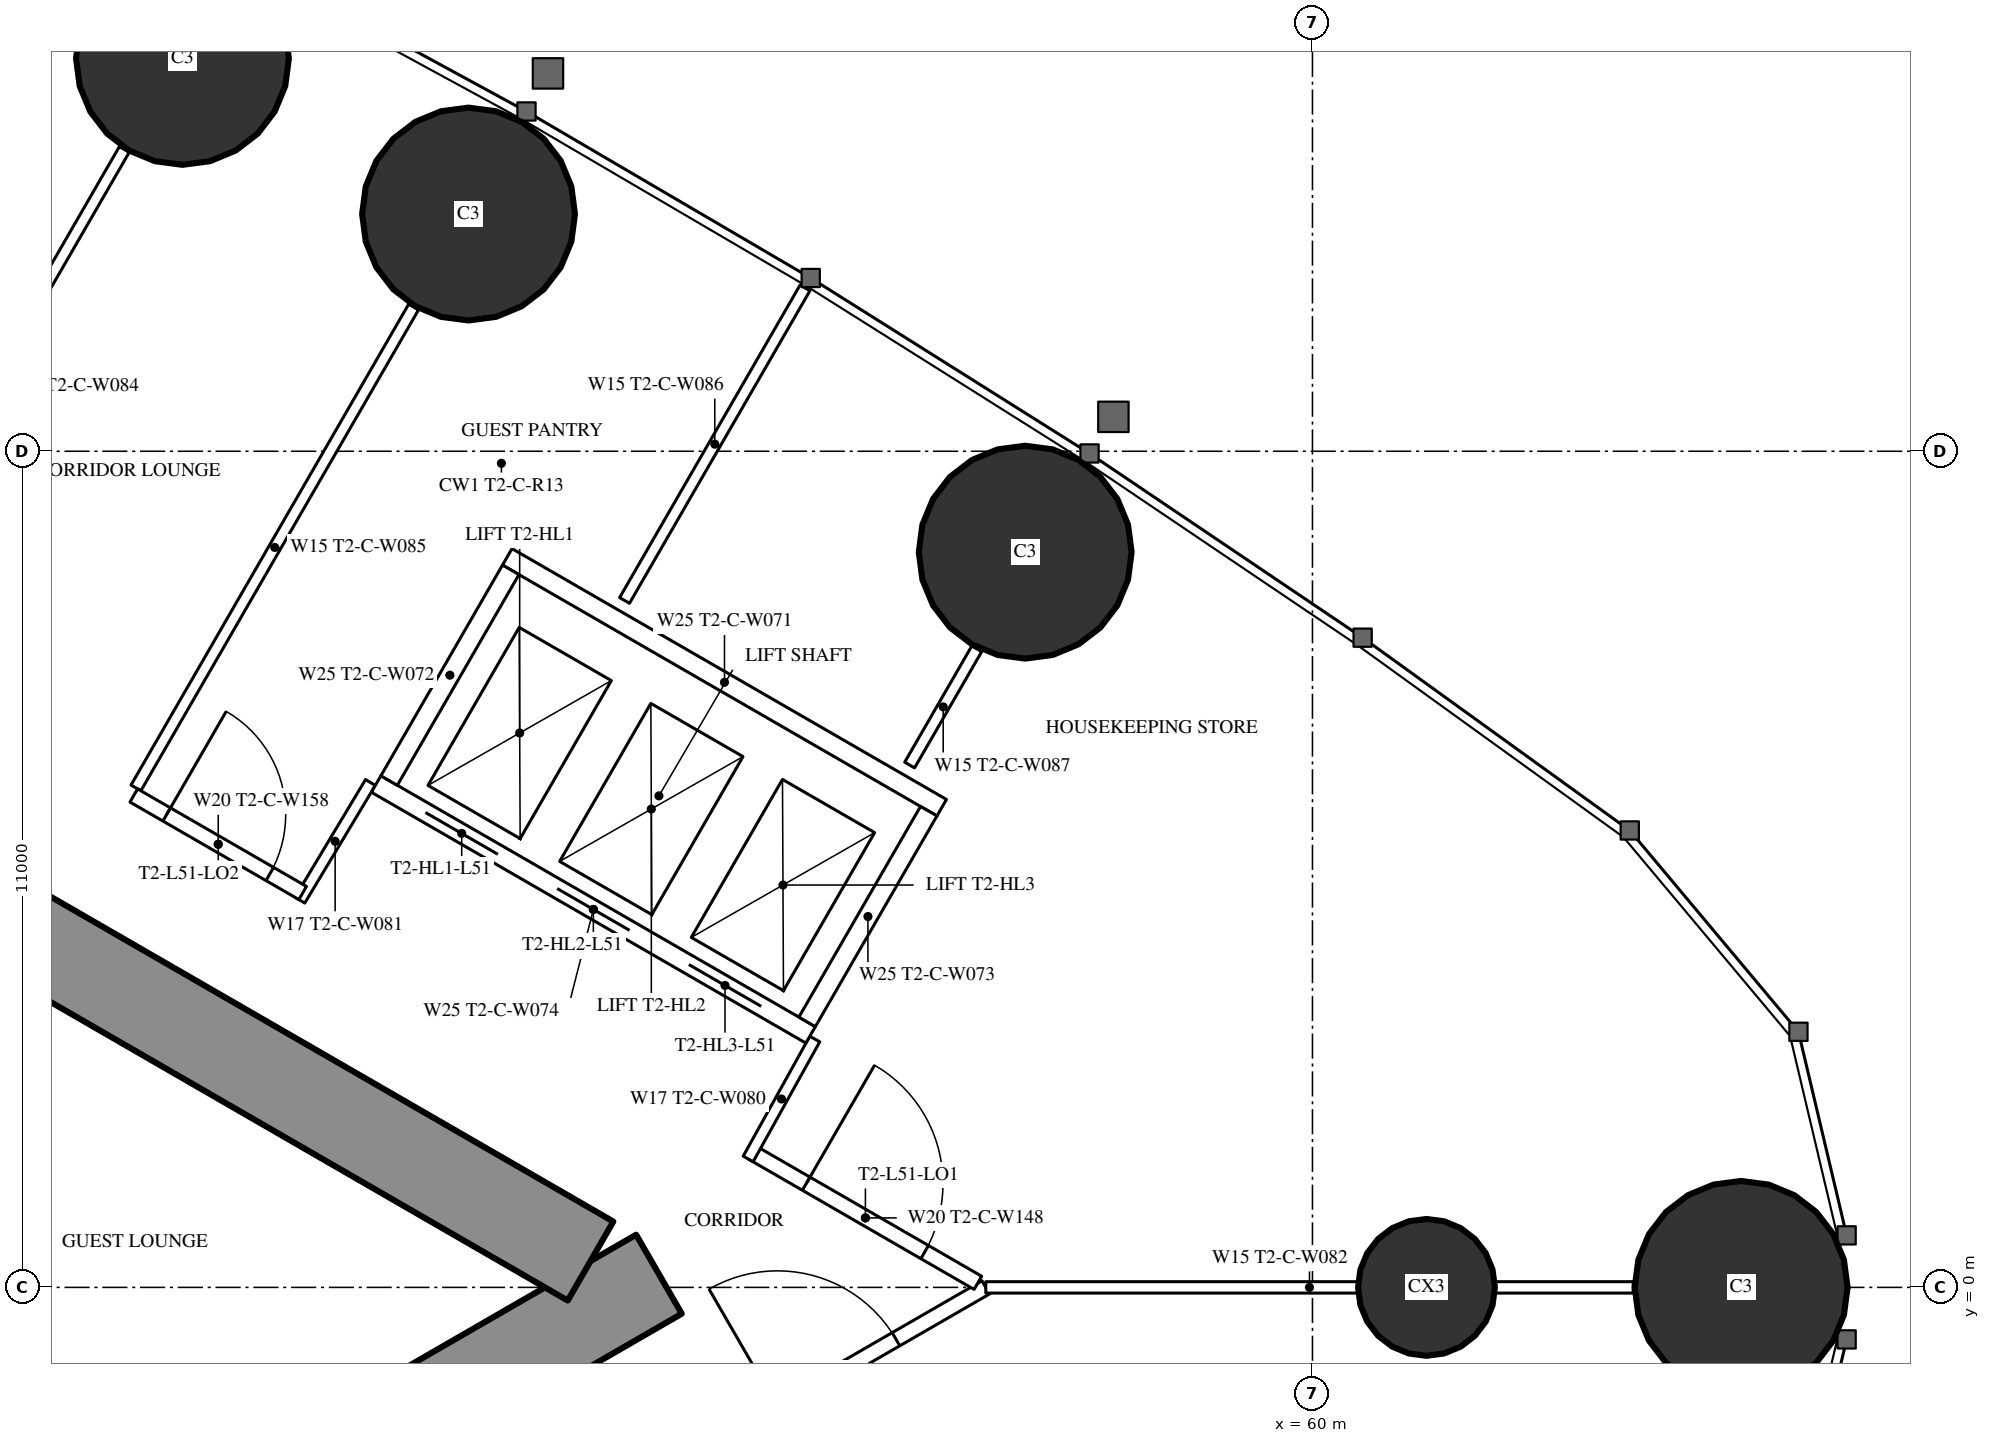
"""IFC4 building model, lengths in metres.
Left out: names, types, materials, properties, quantities, classifications, styles, units other than length and angle.
Written with IfcOpenShell. Run it as: python <this file> out.ifc"""

import sys

from ifc_helpers import new_model, si_unit, direction, frame, frame_2d, origin, origin_2d, place, context, subcontext, project, spatial, rectangle, circle, extrude, element, fill, save


model = new_model("IFC4")
c1 = context("Model", 3, precision=1e-05, world=origin(), true_north=direction((0.0, 1.0)))
c2 = subcontext(c1, "Body", "Model", "MODEL_VIEW")
j1 = project(units=[si_unit("LENGTHUNIT", "METRE"), si_unit("PLANEANGLEUNIT", "RADIAN")], contexts=[c1])
p1 = place(None, origin())
s1 = spatial("IfcSite", under=j1, at=p1, CompositionType="ELEMENT")
p2 = place(p1, origin())
s2 = spatial("IfcBuilding", under=s1, at=p2, CompositionType="ELEMENT")
p3 = place(p2, frame((0.0, 0.0, 191.3)))
s3 = spatial("IfcBuildingStorey", under=s2, at=p3, CompositionType="ELEMENT", Elevation=191.3)
for number, where, z_axis, x_axis in (
    (1, (65.64, 0.0, 0.0), (0.0, 0.0, 1.0), (1.0, 0.0, 0.0)),
    (2, (56.221, 9.672, 0.0), (0.0, 0.0, 1.0), (1.0, 0.0, 0.0)),
    (3, (48.897, 14.121, 0.0), (0.0, 0.0, 1.0), (1.0, 0.0, 0.0)),
    (4, (45.134, 16.168, 0.0), (0.0, 0.0, 1.0), (1.0, 0.0, 0.0)),
):
    element("IfcColumn", number, at=place(p3, frame(where, z_axis=z_axis, x_axis=x_axis)), inside=s3, PredefinedType="COLUMN", context=c2, shape_type="SweptSolid", body=[
        extrude(circle(Radius=1.4, at=origin_2d()), origin(), (0.0, 0.0, 1.0), 3.5),
    ])
p4 = place(p3, frame((61.5, 0.0, 0.0), z_axis=(0.0, 0.0, 1.0), x_axis=(1.0, 0.0, 0.0)))
e5 = element("IfcColumn", 5, at=p4, inside=s3, PredefinedType="COLUMN", context=c2, shape_type="SweptSolid", body=[
    extrude(circle(Radius=0.9, at=origin_2d()), origin(), (0.0, 0.0, 1.0), 3.5),
])
p5 = place(p3, frame((27.2, -13.8, 0.0), z_axis=(0.0, 0.0, 1.0), x_axis=(0.866027159892, 0.499996958321, 0.0)))
e6 = element("IfcWall", 6, at=p5, inside=s3, PredefinedType="SHEAR", context=c2, shape_type="SweptSolid", body=[
    extrude(rectangle(XDim=27.947, YDim=1.2, at=frame_2d((13.973, 0.0))), origin(), (0.0, 0.0, 1.0), 3.5),
])
p6 = place(p5, frame((4.6, 0.0, 0.0)))
e7 = element("IfcOpeningElement", 7, at=p6, cuts=e6, PredefinedType="OPENING", context=c2, shape_type="SweptSolid", body=[
    extrude(rectangle(XDim=1.0, YDim=2.2, at=frame_2d((0.5, 1.1))), frame((0.0, 0.61, 0.0), z_axis=(0.0, -1.0, 0.0), x_axis=(1.0, 0.0, 0.0)), (0.0, 0.0, 1.0), 1.22),
])
p7 = place(p5, frame((13.395, 0.0, 0.0)))
e8 = element("IfcOpeningElement", 8, at=p7, cuts=e6, PredefinedType="OPENING", context=c2, shape_type="SweptSolid", body=[
    extrude(rectangle(XDim=1.8, YDim=2.2, at=frame_2d((0.9, 1.1))), frame((0.0, 0.61, 0.0), z_axis=(0.0, -1.0, 0.0), x_axis=(1.0, 0.0, 0.0)), (0.0, 0.0, 1.0), 1.22),
])
p8 = place(p3, frame((27.2, 13.8, 0.0), z_axis=(0.0, 0.0, 1.0), x_axis=(0.866024515034, -0.500001539357, 0.0)))
e9 = element("IfcWall", 9, at=p8, inside=s3, PredefinedType="SHEAR", context=c2, shape_type="SweptSolid", body=[
    extrude(rectangle(XDim=26.907, YDim=1.2, at=frame_2d((13.454, 0.0))), origin(), (0.0, 0.0, 1.0), 3.5),
])
p9 = place(p8, frame((4.6, 0.0, 0.0)))
e10 = element("IfcOpeningElement", 10, at=p9, cuts=e9, PredefinedType="OPENING", context=c2, shape_type="SweptSolid", body=[
    extrude(rectangle(XDim=1.0, YDim=2.2, at=frame_2d((0.5, 1.1))), frame((0.0, 0.61, 0.0), z_axis=(0.0, -1.0, 0.0), x_axis=(1.0, 0.0, 0.0)), (0.0, 0.0, 1.0), 1.22),
])
p10 = place(p8, frame((13.395, 0.0, 0.0)))
e11 = element("IfcOpeningElement", 11, at=p10, cuts=e9, PredefinedType="OPENING", context=c2, shape_type="SweptSolid", body=[
    extrude(rectangle(XDim=1.8, YDim=2.2, at=frame_2d((0.9, 1.1))), frame((0.0, 0.61, 0.0), z_axis=(0.0, -1.0, 0.0), x_axis=(1.0, 0.0, 0.0)), (0.0, 0.0, 1.0), 1.22),
])
p11 = place(p3, frame((27.959, -16.017, 0.0), z_axis=(0.0, 0.0, 1.0), x_axis=(0.866024151371, 0.500002169237, 0.0)))
e12 = element("IfcWall", 12, at=p11, inside=s3, PredefinedType="PARTITIONING", context=c2, shape_type="SweptSolid", body=[
    extrude(rectangle(XDim=32.034, YDim=0.2, at=frame_2d((16.017, 0.0))), origin(), (0.0, 0.0, 1.0), 3.25),
])
p12 = place(p11, frame((0.6, 0.0, 0.0)))
e13 = element("IfcOpeningElement", 13, at=p12, cuts=e12, PredefinedType="OPENING", context=c2, shape_type="SweptSolid", body=[
    extrude(rectangle(XDim=0.95, YDim=2.2, at=frame_2d((0.475, 1.1))), frame((0.0, 0.11, 0.0), z_axis=(0.0, -1.0, 0.0), x_axis=(1.0, 0.0, 0.0)), (0.0, 0.0, 1.0), 0.22),
])
p13 = place(p11, frame((13.132, 0.0, 0.0)))
e14 = element("IfcOpeningElement", 14, at=p13, cuts=e12, PredefinedType="OPENING", context=c2, shape_type="SweptSolid", body=[
    extrude(rectangle(XDim=0.95, YDim=2.2, at=frame_2d((0.475, 1.1))), frame((0.0, 0.11, 0.0), z_axis=(0.0, -1.0, 0.0), x_axis=(1.0, 0.0, 0.0)), (0.0, 0.0, 1.0), 0.22),
])
p14 = place(p11, frame((15.391, 0.0, 0.0)))
e15 = element("IfcOpeningElement", 15, at=p14, cuts=e12, PredefinedType="OPENING", context=c2, shape_type="SweptSolid", body=[
    extrude(rectangle(XDim=0.95, YDim=2.2, at=frame_2d((0.475, 1.1))), frame((0.0, 0.11, 0.0), z_axis=(0.0, -1.0, 0.0), x_axis=(1.0, 0.0, 0.0)), (0.0, 0.0, 1.0), 0.22),
])
p15 = place(p11, frame((19.441, 0.0, 0.0)))
e16 = element("IfcOpeningElement", 16, at=p15, cuts=e12, PredefinedType="OPENING", context=c2, shape_type="SweptSolid", body=[
    extrude(rectangle(XDim=0.95, YDim=2.2, at=frame_2d((0.475, 1.1))), frame((0.0, 0.11, 0.0), z_axis=(0.0, -1.0, 0.0), x_axis=(1.0, 0.0, 0.0)), (0.0, 0.0, 1.0), 0.22),
])
p16 = place(p11, frame((26.406, 0.0, 0.0)))
e17 = element("IfcOpeningElement", 17, at=p16, cuts=e12, PredefinedType="OPENING", context=c2, shape_type="SweptSolid", body=[
    extrude(rectangle(XDim=0.95, YDim=2.2, at=frame_2d((0.475, 1.1))), frame((0.0, 0.11, 0.0), z_axis=(0.0, -1.0, 0.0), x_axis=(1.0, 0.0, 0.0)), (0.0, 0.0, 1.0), 0.22),
])
p17 = place(p11, frame((28.87, 0.0, 0.0)))
e18 = element("IfcOpeningElement", 18, at=p17, cuts=e12, PredefinedType="OPENING", context=c2, shape_type="SweptSolid", body=[
    extrude(rectangle(XDim=1.8, YDim=2.2, at=frame_2d((0.9, 1.1))), frame((0.0, 0.11, 0.0), z_axis=(0.0, -1.0, 0.0), x_axis=(1.0, 0.0, 0.0)), (0.0, 0.0, 1.0), 0.22),
])
p18 = place(p3, frame((40.769, 8.737, 0.0), z_axis=(0.0, 0.0, 1.0), x_axis=(0.500013115284, 0.866017831539, 0.0)))
e19 = element("IfcWall", 19, at=p18, inside=s3, PredefinedType="PARTITIONING", context=c2, shape_type="SweptSolid", body=[
    extrude(rectangle(XDim=7.198, YDim=0.15, at=frame_2d((3.599, 0.0))), origin(), (0.0, 0.0, 1.0), 2.3),
])
p19 = place(p3, frame((44.521, 6.571, 0.0), z_axis=(0.0, 0.0, 1.0), x_axis=(0.500020376429, 0.866013639128, 0.0)))
e20 = element("IfcWall", 20, at=p19, inside=s3, PredefinedType="PARTITIONING", context=c2, shape_type="SweptSolid", body=[
    extrude(rectangle(XDim=7.306, YDim=0.15, at=frame_2d((3.653, 0.0))), origin(), (0.0, 0.0, 1.0), 2.3),
])
p20 = place(p3, frame((55.702, 0.0, 0.0), z_axis=(0.0, 0.0, 1.0), x_axis=(1.0, 0.0, 0.0)))
e21 = element("IfcWall", 21, at=p20, inside=s3, PredefinedType="PARTITIONING", context=c2, shape_type="SweptSolid", body=[
    extrude(rectangle(XDim=8.518, YDim=0.15, at=frame_2d((4.259, 0.0))), origin(), (0.0, 0.0, 1.0), 2.3),
])
p21 = place(p3, frame((50.95, 9.037, 0.0), z_axis=(0.0, 0.0, 1.0), x_axis=(0.499988022762, 0.866032318735, 0.0)))
e22 = element("IfcWall", 22, at=p21, inside=s3, PredefinedType="PARTITIONING", context=c2, shape_type="SweptSolid", body=[
    extrude(rectangle(XDim=4.748, YDim=0.15, at=frame_2d((2.374, 0.0))), origin(), (0.0, 0.0, 1.0), 3.25),
])
p22 = place(p3, frame((54.7, 6.872, 0.0), z_axis=(0.0, 0.0, 1.0), x_axis=(0.499989690894, 0.866031355668, 0.0)))
e23 = element("IfcWall", 23, at=p22, inside=s3, PredefinedType="PARTITIONING", context=c2, shape_type="SweptSolid", body=[
    extrude(rectangle(XDim=1.766, YDim=0.15, at=frame_2d((0.883, 0.0))), origin(), (0.0, 0.0, 1.0), 3.25),
])
p23 = place(p3, frame((52.639, 1.769, 0.0), z_axis=(0.0, 0.0, 1.0), x_axis=(0.866027340901, -0.4999966448, 0.0)))
e24 = element("IfcWall", 24, at=p23, inside=s3, PredefinedType="PARTITIONING", context=c2, shape_type="SweptSolid", body=[
    extrude(rectangle(XDim=3.417, YDim=0.2, at=frame_2d((1.708, 0.0))), origin(), (0.0, 0.0, 1.0), 3.25),
])
p24 = place(p23, frame((0.809, 0.0, 0.0)))
e25 = element("IfcOpeningElement", 25, at=p24, cuts=e24, PredefinedType="OPENING", context=c2, shape_type="SweptSolid", body=[
    extrude(rectangle(XDim=1.8, YDim=2.2, at=frame_2d((0.9, 1.1))), frame((0.0, 0.11, 0.0), z_axis=(0.0, -1.0, 0.0), x_axis=(1.0, 0.0, 0.0)), (0.0, 0.0, 1.0), 0.22),
])
for number, where, z_axis, x_axis in (
    (26, (52.576, 1.689, 0.0), (0.0, 0.0, 1.0), (0.485, 0.874, 0.0)),
    (27, (47.606, 6.643, 0.0), (0.0, 0.0, 1.0), (-0.514, -0.858, 0.0)),
):
    element("IfcWall", number, at=place(p3, frame(where, z_axis=z_axis, x_axis=x_axis)), inside=s3, PredefinedType="PARTITIONING", context=c2, shape_type="SweptSolid", body=[
        extrude(rectangle(XDim=1.805, YDim=0.15, at=frame_2d((0.902, 0.0))), origin(), (0.0, 0.0, 1.0), 3.25),
    ])
p25 = place(p3, frame((44.493, 6.472, 0.0), z_axis=(0.0, 0.0, 1.0), x_axis=(0.866027140358, -0.499996992154, 0.0)))
e28 = element("IfcWall", 28, at=p25, inside=s3, PredefinedType="PARTITIONING", context=c2, shape_type="SweptSolid", body=[
    extrude(rectangle(XDim=2.566, YDim=0.2, at=frame_2d((1.283, 0.0))), origin(), (0.0, 0.0, 1.0), 3.25),
])
p26 = place(p25, frame((0.5, 0.0, 0.0)))
e29 = element("IfcOpeningElement", 29, at=p26, cuts=e28, PredefinedType="OPENING", context=c2, shape_type="SweptSolid", body=[
    extrude(rectangle(XDim=1.566, YDim=2.2, at=frame_2d((0.783, 1.1))), frame((0.0, 0.11, 0.0), z_axis=(0.0, -1.0, 0.0), x_axis=(1.0, 0.0, 0.0)), (0.0, 0.0, 1.0), 0.22),
])
p27 = place(p3, frame((47.681, 6.622, 0.0), z_axis=(0.0, 0.0, 1.0), x_axis=(0.86603344179, -0.499986077507, 0.0)))
e30 = element("IfcWall", 30, at=p27, inside=s3, PredefinedType="PARTITIONING", context=c2, shape_type="SweptSolid", body=[
    extrude(rectangle(XDim=6.6, YDim=0.25, at=frame_2d((3.3, 0.0))), origin(), (0.0, 0.0, 1.0), 3.25),
])
p28 = place(p27, frame((0.75, 0.0, 0.0)))
e31 = element("IfcOpeningElement", 31, at=p28, cuts=e30, PredefinedType="OPENING", context=c2, shape_type="SweptSolid", body=[
    extrude(rectangle(XDim=1.1, YDim=2.2, at=frame_2d((0.55, 1.1))), frame((0.0, 0.135, 0.0), z_axis=(0.0, -1.0, 0.0), x_axis=(1.0, 0.0, 0.0)), (0.0, 0.0, 1.0), 0.27),
])
p29 = place(p27, frame((2.75, 0.0, 0.0)))
e32 = element("IfcOpeningElement", 32, at=p29, cuts=e30, PredefinedType="OPENING", context=c2, shape_type="SweptSolid", body=[
    extrude(rectangle(XDim=1.1, YDim=2.2, at=frame_2d((0.55, 1.1))), frame((0.0, 0.135, 0.0), z_axis=(0.0, -1.0, 0.0), x_axis=(1.0, 0.0, 0.0)), (0.0, 0.0, 1.0), 0.27),
])
p30 = place(p27, frame((4.75, 0.0, 0.0)))
e33 = element("IfcOpeningElement", 33, at=p30, cuts=e30, PredefinedType="OPENING", context=c2, shape_type="SweptSolid", body=[
    extrude(rectangle(XDim=1.1, YDim=2.2, at=frame_2d((0.55, 1.1))), frame((0.0, 0.135, 0.0), z_axis=(0.0, -1.0, 0.0), x_axis=(1.0, 0.0, 0.0)), (0.0, 0.0, 1.0), 0.27),
])
p31 = place(p3, frame((49.406, 9.611, 0.0), z_axis=(0.0, 0.0, 1.0), x_axis=(0.86603344179, -0.499986077507, 0.0)))
e34 = element("IfcWall", 34, at=p31, inside=s3, PredefinedType="PARTITIONING", context=c2, shape_type="SweptSolid", body=[
    extrude(rectangle(XDim=6.6, YDim=0.25, at=frame_2d((3.3, 0.0))), origin(), (0.0, 0.0, 1.0), 3.25),
])
p32 = place(p3, frame((47.852, 6.668, 0.0), z_axis=(0.0, 0.0, 1.0), x_axis=(0.499929347863, 0.866066190972, 0.0)))
e35 = element("IfcWall", 35, at=p32, inside=s3, PredefinedType="PARTITIONING", context=c2, shape_type="SweptSolid", body=[
    extrude(rectangle(XDim=3.201, YDim=0.25, at=frame_2d((1.6, 0.0))), origin(), (0.0, 0.0, 1.0), 3.25),
])
p33 = place(p3, frame((53.352, 3.493, 0.0), z_axis=(0.0, 0.0, 1.0), x_axis=(0.499872130319, 0.866099216793, 0.0)))
e36 = element("IfcWall", 36, at=p33, inside=s3, PredefinedType="PARTITIONING", context=c2, shape_type="SweptSolid", body=[
    extrude(rectangle(XDim=3.2, YDim=0.25, at=frame_2d((1.6, 0.0))), origin(), (0.0, 0.0, 1.0), 3.25),
])
p34 = place(p17, origin())
e37 = element("IfcDoor", 37, at=p34, inside=s3, OperationType="DOUBLE_DOOR_SINGLE_SWING", PredefinedType="DOOR", context=c2, shape_type="SweptSolid", body=[
    extrude(rectangle(XDim=1.8, YDim=2.2, at=frame_2d((0.9, 1.1))), frame((0.0, 0.025, 0.0), z_axis=(0.0, -1.0, 0.0), x_axis=(1.0, 0.0, 0.0)), (0.0, 0.0, 1.0), 0.05),
])
fill(e18, e37)
p35 = place(p24, origin())
e38 = element("IfcDoor", 38, at=p35, inside=s3, OperationType="DOUBLE_DOOR_SINGLE_SWING", PredefinedType="DOOR", context=c2, shape_type="SweptSolid", body=[
    extrude(rectangle(XDim=1.8, YDim=2.2, at=frame_2d((0.9, 1.1))), frame((0.0, 0.025, 0.0), z_axis=(0.0, -1.0, 0.0), x_axis=(1.0, 0.0, 0.0)), (0.0, 0.0, 1.0), 0.05),
])
fill(e25, e38)
p36 = place(p26, origin())
e39 = element("IfcDoor", 39, at=p36, inside=s3, OperationType="SINGLE_SWING_LEFT", PredefinedType="DOOR", context=c2, shape_type="SweptSolid", body=[
    extrude(rectangle(XDim=1.566, YDim=2.2, at=frame_2d((0.783, 1.1))), frame((0.0, 0.025, 0.0), z_axis=(0.0, -1.0, 0.0), x_axis=(1.0, 0.0, 0.0)), (0.0, 0.0, 1.0), 0.05),
])
fill(e29, e39)
p37 = place(p28, origin())
e40 = element("IfcDoor", 40, at=p37, inside=s3, OperationType="DOUBLE_DOOR_SLIDING", PredefinedType="USERDEFINED", context=c2, shape_type="SweptSolid", body=[
    extrude(rectangle(XDim=1.1, YDim=2.2, at=frame_2d((0.55, 1.1))), frame((0.0, 0.025, 0.0), z_axis=(0.0, -1.0, 0.0), x_axis=(1.0, 0.0, 0.0)), (0.0, 0.0, 1.0), 0.05),
])
fill(e31, e40)
p38 = place(p29, origin())
e41 = element("IfcDoor", 41, at=p38, inside=s3, OperationType="DOUBLE_DOOR_SLIDING", PredefinedType="USERDEFINED", context=c2, shape_type="SweptSolid", body=[
    extrude(rectangle(XDim=1.1, YDim=2.2, at=frame_2d((0.55, 1.1))), frame((0.0, 0.025, 0.0), z_axis=(0.0, -1.0, 0.0), x_axis=(1.0, 0.0, 0.0)), (0.0, 0.0, 1.0), 0.05),
])
fill(e32, e41)
p39 = place(p30, origin())
e42 = element("IfcDoor", 42, at=p39, inside=s3, OperationType="DOUBLE_DOOR_SLIDING", PredefinedType="USERDEFINED", context=c2, shape_type="SweptSolid", body=[
    extrude(rectangle(XDim=1.1, YDim=2.2, at=frame_2d((0.55, 1.1))), frame((0.0, 0.025, 0.0), z_axis=(0.0, -1.0, 0.0), x_axis=(1.0, 0.0, 0.0)), (0.0, 0.0, 1.0), 0.05),
])
fill(e33, e42)
save(model, sys.argv[1])
